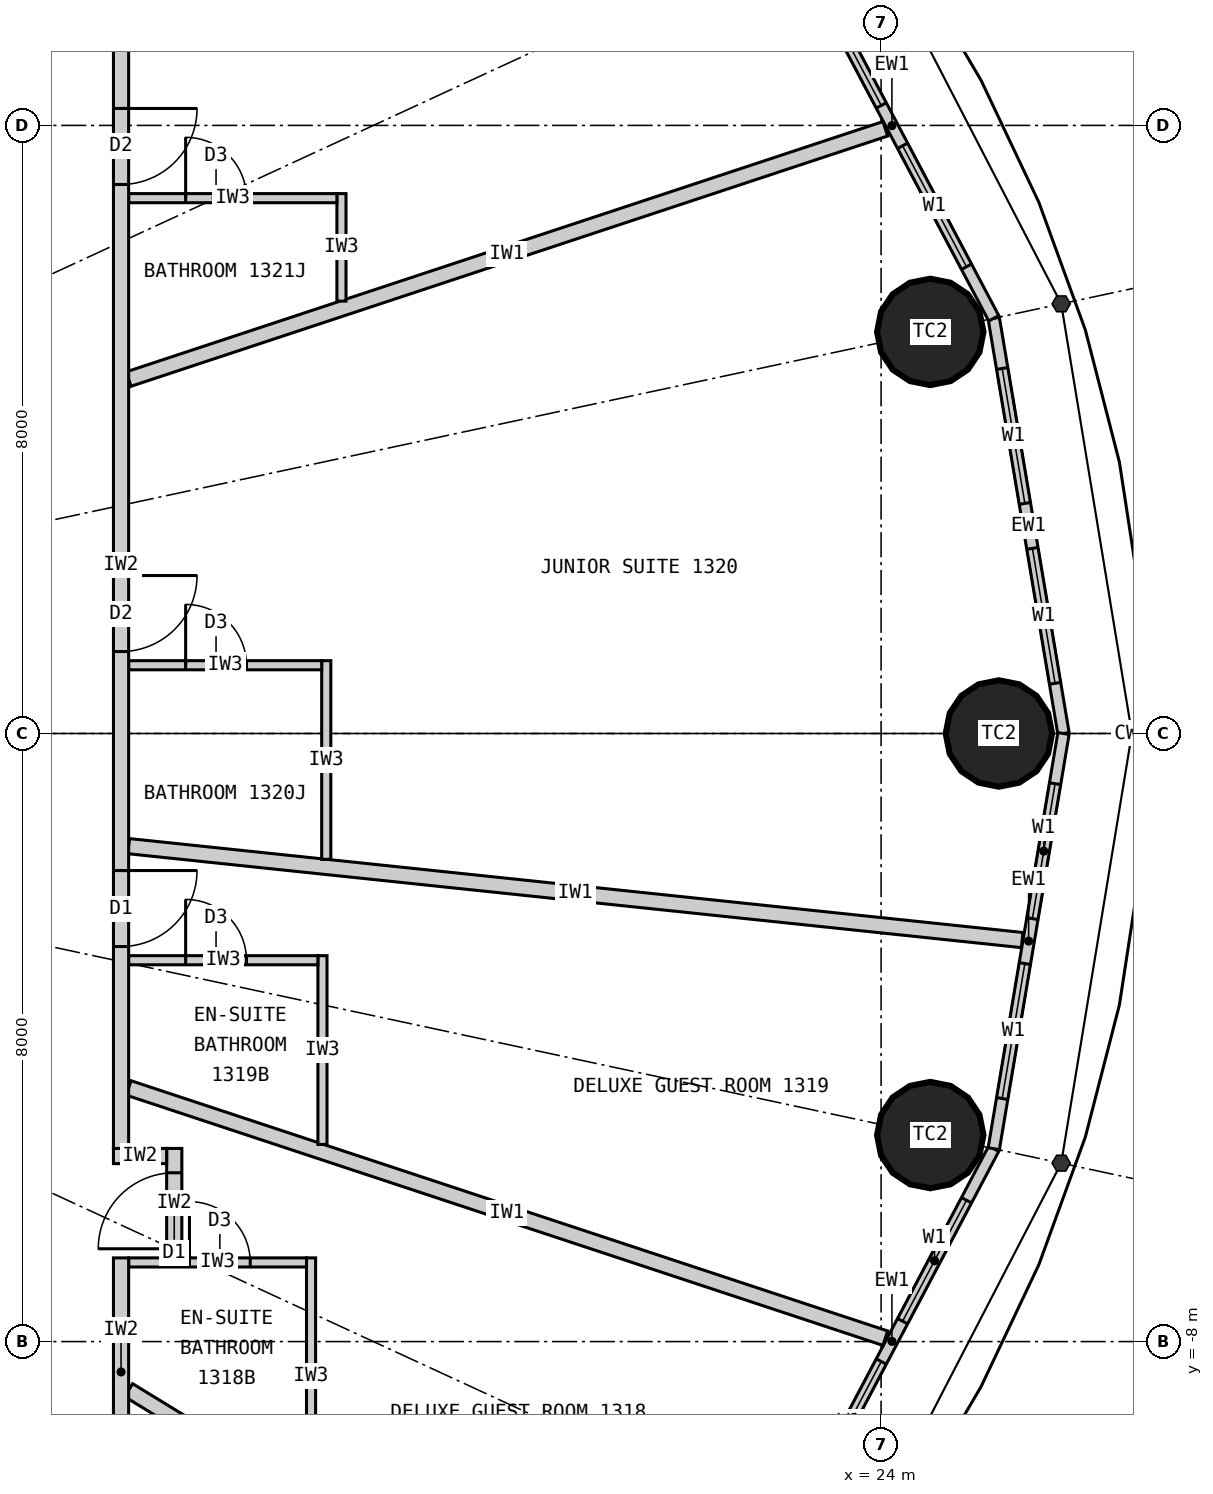
"""IFC4 building model, lengths in metres.
Left out: names, types, materials, properties, quantities, classifications, styles, units other than length and angle.
Written with IfcOpenShell. Run it as: python <this file> out.ifc"""

import sys

from ifc_helpers import new_model, si_unit, direction, frame, frame_2d, origin, origin_2d, place, context, subcontext, project, spatial, rectangle, circle, extrude, element, fill, save


model = new_model("IFC4")
c1 = context("Model", 3, precision=1e-05, world=origin(), true_north=direction((0.0, 1.0)))
c2 = subcontext(c1, "Body", "Model", "MODEL_VIEW")
j1 = project(units=[si_unit("LENGTHUNIT", "METRE"), si_unit("PLANEANGLEUNIT", "RADIAN")], contexts=[c1])
p1 = place(None, origin())
s1 = spatial("IfcSite", under=j1, at=p1, CompositionType="ELEMENT")
p2 = place(p1, origin())
s2 = spatial("IfcBuilding", under=s1, at=p2, CompositionType="ELEMENT")
p3 = place(p2, frame((0.0, 0.0, 57.3)))
s3 = spatial("IfcBuildingStorey", under=s2, at=p3, CompositionType="ELEMENT", Elevation=57.3)
for number, where, z_axis, x_axis in (
    (1, (25.55, 0.0, 0.0), (0.0, 0.0, 1.0), (1.0, 0.0, 0.0)),
    (2, (24.647, 5.283, 0.0), (0.0, 0.0, 1.0), (1.0, 0.0, 0.0)),
    (3, (24.647, -5.283, 0.0), (0.0, 0.0, 1.0), (1.0, 0.0, 0.0)),
):
    element("IfcColumn", number, at=place(p3, frame(where, z_axis=z_axis, x_axis=x_axis)), inside=s3, PredefinedType="COLUMN", context=c2, shape_type="SweptSolid", body=[
        extrude(circle(Radius=0.7, at=origin_2d()), origin(), (0.0, 0.0, 1.0), 3.3),
    ])
p4 = place(p3, frame((26.4, 0.0, 0.0), z_axis=(0.0, 0.0, 1.0), x_axis=(-0.165642551694, 0.986185857264, 0.0)))
e4 = element("IfcWall", 4, at=p4, inside=s3, PredefinedType="ELEMENTEDWALL", context=c2, shape_type="SweptSolid", body=[
    extrude(rectangle(XDim=5.539, YDim=0.15, at=frame_2d((2.77, 0.0))), origin(), (0.0, 0.0, 1.0), 3.12),
])
p5 = place(p4, frame((0.669, 0.0, 0.9)))
e5 = element("IfcOpeningElement", 5, at=p5, cuts=e4, PredefinedType="OPENING", context=c2, shape_type="SweptSolid", body=[
    extrude(rectangle(XDim=1.8, YDim=1.9, at=frame_2d((0.9, 0.95))), frame((0.0, 0.085, 0.0), z_axis=(0.0, -1.0, 0.0), x_axis=(1.0, 0.0, 0.0)), (0.0, 0.0, 1.0), 0.17),
])
p6 = place(p4, frame((3.07, 0.0, 0.9)))
e6 = element("IfcOpeningElement", 6, at=p6, cuts=e4, PredefinedType="OPENING", context=c2, shape_type="SweptSolid", body=[
    extrude(rectangle(XDim=1.8, YDim=1.9, at=frame_2d((0.9, 0.95))), frame((0.0, 0.085, 0.0), z_axis=(0.0, -1.0, 0.0), x_axis=(1.0, 0.0, 0.0)), (0.0, 0.0, 1.0), 0.17),
])
p7 = place(p3, frame((25.482, 5.462, 0.0), z_axis=(0.0, 0.0, 1.0), x_axis=(-0.467296867008, 0.884100468321, 0.0)))
e7 = element("IfcWall", 7, at=p7, inside=s3, PredefinedType="ELEMENTEDWALL", context=c2, shape_type="SweptSolid", body=[
    extrude(rectangle(XDim=5.734, YDim=0.15, at=frame_2d((2.867, 0.0))), origin(), (0.0, 0.0, 1.0), 3.12),
])
p8 = place(p7, frame((0.767, 0.0, 0.9)))
e8 = element("IfcOpeningElement", 8, at=p8, cuts=e7, PredefinedType="OPENING", context=c2, shape_type="SweptSolid", body=[
    extrude(rectangle(XDim=1.8, YDim=1.9, at=frame_2d((0.9, 0.95))), frame((0.0, 0.085, 0.0), z_axis=(0.0, -1.0, 0.0), x_axis=(1.0, 0.0, 0.0)), (0.0, 0.0, 1.0), 0.17),
])
p9 = place(p7, frame((3.167, 0.0, 0.9)))
e9 = element("IfcOpeningElement", 9, at=p9, cuts=e7, PredefinedType="OPENING", context=c2, shape_type="SweptSolid", body=[
    extrude(rectangle(XDim=1.8, YDim=1.9, at=frame_2d((0.9, 0.95))), frame((0.0, 0.085, 0.0), z_axis=(0.0, -1.0, 0.0), x_axis=(1.0, 0.0, 0.0)), (0.0, 0.0, 1.0), 0.17),
])
p10 = place(p3, frame((22.803, -10.532, 0.0), z_axis=(0.0, 0.0, 1.0), x_axis=(0.467296867008, 0.884100468321, 0.0)))
e10 = element("IfcWall", 10, at=p10, inside=s3, PredefinedType="ELEMENTEDWALL", context=c2, shape_type="SweptSolid", body=[
    extrude(rectangle(XDim=5.734, YDim=0.15, at=frame_2d((2.867, 0.0))), origin(), (0.0, 0.0, 1.0), 3.12),
])
p11 = place(p10, frame((0.767, 0.0, 0.9)))
e11 = element("IfcOpeningElement", 11, at=p11, cuts=e10, PredefinedType="OPENING", context=c2, shape_type="SweptSolid", body=[
    extrude(rectangle(XDim=1.8, YDim=1.9, at=frame_2d((0.9, 0.95))), frame((0.0, 0.085, 0.0), z_axis=(0.0, -1.0, 0.0), x_axis=(1.0, 0.0, 0.0)), (0.0, 0.0, 1.0), 0.17),
])
p12 = place(p10, frame((3.167, 0.0, 0.9)))
e12 = element("IfcOpeningElement", 12, at=p12, cuts=e10, PredefinedType="OPENING", context=c2, shape_type="SweptSolid", body=[
    extrude(rectangle(XDim=1.8, YDim=1.9, at=frame_2d((0.9, 0.95))), frame((0.0, 0.085, 0.0), z_axis=(0.0, -1.0, 0.0), x_axis=(1.0, 0.0, 0.0)), (0.0, 0.0, 1.0), 0.17),
])
p13 = place(p3, frame((25.482, -5.462, 0.0), z_axis=(0.0, 0.0, 1.0), x_axis=(0.165642551694, 0.986185857264, 0.0)))
e13 = element("IfcWall", 13, at=p13, inside=s3, PredefinedType="ELEMENTEDWALL", context=c2, shape_type="SweptSolid", body=[
    extrude(rectangle(XDim=5.539, YDim=0.15, at=frame_2d((2.77, 0.0))), origin(), (0.0, 0.0, 1.0), 3.12),
])
p14 = place(p13, frame((0.669, 0.0, 0.9)))
e14 = element("IfcOpeningElement", 14, at=p14, cuts=e13, PredefinedType="OPENING", context=c2, shape_type="SweptSolid", body=[
    extrude(rectangle(XDim=1.8, YDim=1.9, at=frame_2d((0.9, 0.95))), frame((0.0, 0.085, 0.0), z_axis=(0.0, -1.0, 0.0), x_axis=(1.0, 0.0, 0.0)), (0.0, 0.0, 1.0), 0.17),
])
p15 = place(p13, frame((3.07, 0.0, 0.9)))
e15 = element("IfcOpeningElement", 15, at=p15, cuts=e13, PredefinedType="OPENING", context=c2, shape_type="SweptSolid", body=[
    extrude(rectangle(XDim=1.8, YDim=1.9, at=frame_2d((0.9, 0.95))), frame((0.0, 0.085, 0.0), z_axis=(0.0, -1.0, 0.0), x_axis=(1.0, 0.0, 0.0)), (0.0, 0.0, 1.0), 0.17),
])
p16 = place(p3, frame((14.1, 4.663, 0.0), z_axis=(0.0, 0.0, 1.0), x_axis=(0.949432655039, 0.31397075269, 0.0)))
e16 = element("IfcWall", 16, at=p16, inside=s3, PredefinedType="PARTITIONING", context=c2, shape_type="SweptSolid", body=[
    extrude(rectangle(XDim=10.486, YDim=0.2, at=frame_2d((5.243, 0.0))), origin(), (0.0, 0.0, 1.0), 3.12),
])
p17 = place(p3, frame((14.1, -8.639, 0.0), z_axis=(0.0, 0.0, 1.0), x_axis=(0.852672493023, -0.522445805459, 0.0)))
e17 = element("IfcWall", 17, at=p17, inside=s3, PredefinedType="PARTITIONING", context=c2, shape_type="SweptSolid", body=[
    extrude(rectangle(XDim=7.633, YDim=0.2, at=frame_2d((3.817, 0.0))), origin(), (0.0, 0.0, 1.0), 3.12),
])
p18 = place(p3, frame((14.1, -4.663, 0.0), z_axis=(0.0, 0.0, 1.0), x_axis=(0.949432655039, -0.31397075269, 0.0)))
e18 = element("IfcWall", 18, at=p18, inside=s3, PredefinedType="PARTITIONING", context=c2, shape_type="SweptSolid", body=[
    extrude(rectangle(XDim=10.486, YDim=0.2, at=frame_2d((5.243, 0.0))), origin(), (0.0, 0.0, 1.0), 3.12),
])
p19 = place(p3, frame((14.1, -1.482, 0.0), z_axis=(0.0, 0.0, 1.0), x_axis=(0.994522076235, -0.104526742422, 0.0)))
e19 = element("IfcWall", 19, at=p19, inside=s3, PredefinedType="PARTITIONING", context=c2, shape_type="SweptSolid", body=[
    extrude(rectangle(XDim=11.821, YDim=0.2, at=frame_2d((5.91, 0.0))), origin(), (0.0, 0.0, 1.0), 2.32),
])
p20 = place(p3, frame((16.5, -10.01, 0.0), z_axis=(0.0, 0.0, 1.0), x_axis=(0.0, 1.0, 0.0)))
e20 = element("IfcWall", 20, at=p20, inside=s3, PredefinedType="PARTITIONING", context=c2, shape_type="SweptSolid", body=[
    extrude(rectangle(XDim=3.111, YDim=0.12, at=frame_2d((1.555, 0.0))), origin(), (0.0, 0.0, 1.0), 3.12),
])
p21 = place(p3, frame((14.1, -6.959, 0.0), z_axis=(0.0, 0.0, 1.0), x_axis=(1.0, 0.0, 0.0)))
e21 = element("IfcWall", 21, at=p21, inside=s3, PredefinedType="PARTITIONING", context=c2, shape_type="SweptSolid", body=[
    extrude(rectangle(XDim=2.34, YDim=0.12, at=frame_2d((1.17, 0.0))), origin(), (0.0, 0.0, 1.0), 3.12),
])
p22 = place(p21, frame((0.8, 0.0, 0.0)))
e22 = element("IfcOpeningElement", 22, at=p22, cuts=e21, PredefinedType="OPENING", context=c2, shape_type="SweptSolid", body=[
    extrude(rectangle(XDim=0.8, YDim=2.1, at=frame_2d((0.4, 1.05))), frame((0.0, 0.07, 0.0), z_axis=(0.0, -1.0, 0.0), x_axis=(1.0, 0.0, 0.0)), (0.0, 0.0, 1.0), 0.14),
])
p23 = place(p3, frame((16.65, -5.406, 0.0), z_axis=(0.0, 0.0, 1.0), x_axis=(0.0, 1.0, 0.0)))
e23 = element("IfcWall", 23, at=p23, inside=s3, PredefinedType="PARTITIONING", context=c2, shape_type="SweptSolid", body=[
    extrude(rectangle(XDim=2.483, YDim=0.12, at=frame_2d((1.242, 0.0))), origin(), (0.0, 0.0, 1.0), 3.12),
])
p24 = place(p3, frame((14.1, -2.983, 0.0), z_axis=(0.0, 0.0, 1.0), x_axis=(1.0, 0.0, 0.0)))
e24 = element("IfcWall", 24, at=p24, inside=s3, PredefinedType="PARTITIONING", context=c2, shape_type="SweptSolid", body=[
    extrude(rectangle(XDim=2.49, YDim=0.12, at=frame_2d((1.245, 0.0))), origin(), (0.0, 0.0, 1.0), 3.12),
])
p25 = place(p24, frame((0.75, 0.0, 0.0)))
e25 = element("IfcOpeningElement", 25, at=p25, cuts=e24, PredefinedType="OPENING", context=c2, shape_type="SweptSolid", body=[
    extrude(rectangle(XDim=0.8, YDim=2.1, at=frame_2d((0.4, 1.05))), frame((0.0, 0.07, 0.0), z_axis=(0.0, -1.0, 0.0), x_axis=(1.0, 0.0, 0.0)), (0.0, 0.0, 1.0), 0.14),
])
p26 = place(p3, frame((16.7, -1.655, 0.0), z_axis=(0.0, 0.0, 1.0), x_axis=(0.0, 1.0, 0.0)))
e26 = element("IfcWall", 26, at=p26, inside=s3, PredefinedType="PARTITIONING", context=c2, shape_type="SweptSolid", body=[
    extrude(rectangle(XDim=2.613, YDim=0.12, at=frame_2d((1.307, 0.0))), origin(), (0.0, 0.0, 1.0), 3.12),
])
p27 = place(p3, frame((14.1, 0.898, 0.0), z_axis=(0.0, 0.0, 1.0), x_axis=(1.0, 0.0, 0.0)))
e27 = element("IfcWall", 27, at=p27, inside=s3, PredefinedType="PARTITIONING", context=c2, shape_type="SweptSolid", body=[
    extrude(rectangle(XDim=2.54, YDim=0.12, at=frame_2d((1.27, 0.0))), origin(), (0.0, 0.0, 1.0), 3.12),
])
p28 = place(p27, frame((0.75, 0.0, 0.0)))
e28 = element("IfcOpeningElement", 28, at=p28, cuts=e27, PredefinedType="OPENING", context=c2, shape_type="SweptSolid", body=[
    extrude(rectangle(XDim=0.8, YDim=2.1, at=frame_2d((0.4, 1.05))), frame((0.0, 0.07, 0.0), z_axis=(0.0, -1.0, 0.0), x_axis=(1.0, 0.0, 0.0)), (0.0, 0.0, 1.0), 0.14),
])
p29 = place(p3, frame((16.9, 5.689, 0.0), z_axis=(0.0, 0.0, 1.0), x_axis=(0.0, 1.0, 0.0)))
e29 = element("IfcWall", 29, at=p29, inside=s3, PredefinedType="PARTITIONING", context=c2, shape_type="SweptSolid", body=[
    extrude(rectangle(XDim=1.414, YDim=0.12, at=frame_2d((0.707, 0.0))), origin(), (0.0, 0.0, 1.0), 3.12),
])
p30 = place(p3, frame((14.1, 7.043, 0.0), z_axis=(0.0, 0.0, 1.0), x_axis=(1.0, 0.0, 0.0)))
e30 = element("IfcWall", 30, at=p30, inside=s3, PredefinedType="PARTITIONING", context=c2, shape_type="SweptSolid", body=[
    extrude(rectangle(XDim=2.74, YDim=0.12, at=frame_2d((1.37, 0.0))), origin(), (0.0, 0.0, 1.0), 3.12),
])
p31 = place(p30, frame((0.75, 0.0, 0.0)))
e31 = element("IfcOpeningElement", 31, at=p31, cuts=e30, PredefinedType="OPENING", context=c2, shape_type="SweptSolid", body=[
    extrude(rectangle(XDim=0.8, YDim=2.1, at=frame_2d((0.4, 1.05))), frame((0.0, 0.07, 0.0), z_axis=(0.0, -1.0, 0.0), x_axis=(1.0, 0.0, 0.0)), (0.0, 0.0, 1.0), 0.14),
])
p32 = place(p3, frame((14.7, -6.899, 0.0), z_axis=(0.0, 0.0, 1.0), x_axis=(0.0, 1.0, 0.0)))
e32 = element("IfcWall", 32, at=p32, inside=s3, PredefinedType="PARTITIONING", context=c2, shape_type="SweptSolid", body=[
    extrude(rectangle(XDim=1.44, YDim=0.2, at=frame_2d((0.72, 0.0))), origin(), (0.0, 0.0, 1.0), 3.12),
])
p33 = place(p32, frame((0.12, 0.0, 0.0)))
e33 = element("IfcOpeningElement", 33, at=p33, cuts=e32, PredefinedType="OPENING", context=c2, shape_type="SweptSolid", body=[
    extrude(rectangle(XDim=1.0, YDim=2.2, at=frame_2d((0.5, 1.1))), frame((0.0, 0.11, 0.0), z_axis=(0.0, -1.0, 0.0), x_axis=(1.0, 0.0, 0.0)), (0.0, 0.0, 1.0), 0.22),
])
p34 = place(p3, frame((13.9, -5.559, 0.0), z_axis=(0.0, 0.0, 1.0), x_axis=(1.0, 0.0, 0.0)))
e34 = element("IfcWall", 34, at=p34, inside=s3, PredefinedType="PARTITIONING", context=c2, shape_type="SweptSolid", body=[
    extrude(rectangle(XDim=0.7, YDim=0.2, at=frame_2d((0.35, 0.0))), origin(), (0.0, 0.0, 1.0), 3.12),
])
p35 = place(p3, frame((14.0, -9.9, 0.0), z_axis=(0.0, 0.0, 1.0), x_axis=(0.0, 1.0, 0.0)))
e35 = element("IfcWall", 35, at=p35, inside=s3, PredefinedType="PARTITIONING", context=c2, shape_type="SweptSolid", body=[
    extrude(rectangle(XDim=3.001, YDim=0.2, at=frame_2d((1.5, 0.0))), origin(), (0.0, 0.0, 1.0), 3.12),
])
p36 = place(p3, frame((14.0, -5.459, 0.0), z_axis=(0.0, 0.0, 1.0), x_axis=(0.0, 1.0, 0.0)))
e36 = element("IfcWall", 36, at=p36, inside=s3, PredefinedType="PARTITIONING", context=c2, shape_type="SweptSolid", body=[
    extrude(rectangle(XDim=15.359, YDim=0.2, at=frame_2d((7.679, 0.0))), origin(), (0.0, 0.0, 1.0), 3.12),
])
p37 = place(p36, frame((2.656, 0.0, 0.0)))
e37 = element("IfcOpeningElement", 37, at=p37, cuts=e36, PredefinedType="OPENING", context=c2, shape_type="SweptSolid", body=[
    extrude(rectangle(XDim=1.0, YDim=2.2, at=frame_2d((0.5, 1.1))), frame((0.0, 0.11, 0.0), z_axis=(0.0, -1.0, 0.0), x_axis=(1.0, 0.0, 0.0)), (0.0, 0.0, 1.0), 0.22),
])
p38 = place(p36, frame((6.537, 0.0, 0.0)))
e38 = element("IfcOpeningElement", 38, at=p38, cuts=e36, PredefinedType="OPENING", context=c2, shape_type="SweptSolid", body=[
    extrude(rectangle(XDim=1.0, YDim=2.2, at=frame_2d((0.5, 1.1))), frame((0.0, 0.11, 0.0), z_axis=(0.0, -1.0, 0.0), x_axis=(1.0, 0.0, 0.0)), (0.0, 0.0, 1.0), 0.22),
])
p39 = place(p36, frame((12.682, 0.0, 0.0)))
e39 = element("IfcOpeningElement", 39, at=p39, cuts=e36, PredefinedType="OPENING", context=c2, shape_type="SweptSolid", body=[
    extrude(rectangle(XDim=1.0, YDim=2.2, at=frame_2d((0.5, 1.1))), frame((0.0, 0.11, 0.0), z_axis=(0.0, -1.0, 0.0), x_axis=(1.0, 0.0, 0.0)), (0.0, 0.0, 1.0), 0.22),
])
p40 = place(p5, origin())
e40 = element("IfcWindow", 40, at=p40, inside=s3, PartitioningType="SINGLE_PANEL", PredefinedType="WINDOW", context=c2, shape_type="SweptSolid", body=[
    extrude(rectangle(XDim=1.8, YDim=1.9, at=frame_2d((0.9, 0.95))), frame((0.0, 0.03, 0.0), z_axis=(0.0, -1.0, 0.0), x_axis=(1.0, 0.0, 0.0)), (0.0, 0.0, 1.0), 0.06),
])
fill(e5, e40)
p41 = place(p6, origin())
e41 = element("IfcWindow", 41, at=p41, inside=s3, PartitioningType="SINGLE_PANEL", PredefinedType="WINDOW", context=c2, shape_type="SweptSolid", body=[
    extrude(rectangle(XDim=1.8, YDim=1.9, at=frame_2d((0.9, 0.95))), frame((0.0, 0.03, 0.0), z_axis=(0.0, -1.0, 0.0), x_axis=(1.0, 0.0, 0.0)), (0.0, 0.0, 1.0), 0.06),
])
fill(e6, e41)
p42 = place(p8, origin())
e42 = element("IfcWindow", 42, at=p42, inside=s3, PartitioningType="SINGLE_PANEL", PredefinedType="WINDOW", context=c2, shape_type="SweptSolid", body=[
    extrude(rectangle(XDim=1.8, YDim=1.9, at=frame_2d((0.9, 0.95))), frame((0.0, 0.03, 0.0), z_axis=(0.0, -1.0, 0.0), x_axis=(1.0, 0.0, 0.0)), (0.0, 0.0, 1.0), 0.06),
])
fill(e8, e42)
p43 = place(p9, origin())
e43 = element("IfcWindow", 43, at=p43, inside=s3, PartitioningType="SINGLE_PANEL", PredefinedType="WINDOW", context=c2, shape_type="SweptSolid", body=[
    extrude(rectangle(XDim=1.8, YDim=1.9, at=frame_2d((0.9, 0.95))), frame((0.0, 0.03, 0.0), z_axis=(0.0, -1.0, 0.0), x_axis=(1.0, 0.0, 0.0)), (0.0, 0.0, 1.0), 0.06),
])
fill(e9, e43)
p44 = place(p11, origin())
e44 = element("IfcWindow", 44, at=p44, inside=s3, PartitioningType="SINGLE_PANEL", PredefinedType="WINDOW", context=c2, shape_type="SweptSolid", body=[
    extrude(rectangle(XDim=1.8, YDim=1.9, at=frame_2d((0.9, 0.95))), frame((0.0, 0.03, 0.0), z_axis=(0.0, -1.0, 0.0), x_axis=(1.0, 0.0, 0.0)), (0.0, 0.0, 1.0), 0.06),
])
fill(e11, e44)
p45 = place(p12, origin())
e45 = element("IfcWindow", 45, at=p45, inside=s3, PartitioningType="SINGLE_PANEL", PredefinedType="WINDOW", context=c2, shape_type="SweptSolid", body=[
    extrude(rectangle(XDim=1.8, YDim=1.9, at=frame_2d((0.9, 0.95))), frame((0.0, 0.03, 0.0), z_axis=(0.0, -1.0, 0.0), x_axis=(1.0, 0.0, 0.0)), (0.0, 0.0, 1.0), 0.06),
])
fill(e12, e45)
p46 = place(p14, origin())
e46 = element("IfcWindow", 46, at=p46, inside=s3, PartitioningType="SINGLE_PANEL", PredefinedType="WINDOW", context=c2, shape_type="SweptSolid", body=[
    extrude(rectangle(XDim=1.8, YDim=1.9, at=frame_2d((0.9, 0.95))), frame((0.0, 0.03, 0.0), z_axis=(0.0, -1.0, 0.0), x_axis=(1.0, 0.0, 0.0)), (0.0, 0.0, 1.0), 0.06),
])
fill(e14, e46)
p47 = place(p15, origin())
e47 = element("IfcWindow", 47, at=p47, inside=s3, PartitioningType="SINGLE_PANEL", PredefinedType="WINDOW", context=c2, shape_type="SweptSolid", body=[
    extrude(rectangle(XDim=1.8, YDim=1.9, at=frame_2d((0.9, 0.95))), frame((0.0, 0.03, 0.0), z_axis=(0.0, -1.0, 0.0), x_axis=(1.0, 0.0, 0.0)), (0.0, 0.0, 1.0), 0.06),
])
fill(e15, e47)
p48 = place(p22, origin())
e48 = element("IfcDoor", 48, at=p48, inside=s3, OperationType="SINGLE_SWING_LEFT", PredefinedType="DOOR", context=c2, shape_type="SweptSolid", body=[
    extrude(rectangle(XDim=0.8, YDim=2.1, at=frame_2d((0.4, 1.05))), frame((0.0, 0.025, 0.0), z_axis=(0.0, -1.0, 0.0), x_axis=(1.0, 0.0, 0.0)), (0.0, 0.0, 1.0), 0.05),
])
fill(e22, e48)
p49 = place(p33, origin())
e49 = element("IfcDoor", 49, at=p49, inside=s3, OperationType="SINGLE_SWING_LEFT", PredefinedType="DOOR", context=c2, shape_type="SweptSolid", body=[
    extrude(rectangle(XDim=1.0, YDim=2.2, at=frame_2d((0.5, 1.1))), frame((0.0, 0.025, 0.0), z_axis=(0.0, -1.0, 0.0), x_axis=(1.0, 0.0, 0.0)), (0.0, 0.0, 1.0), 0.05),
])
fill(e33, e49)
p50 = place(p25, origin())
e50 = element("IfcDoor", 50, at=p50, inside=s3, OperationType="SINGLE_SWING_LEFT", PredefinedType="DOOR", context=c2, shape_type="SweptSolid", body=[
    extrude(rectangle(XDim=0.8, YDim=2.1, at=frame_2d((0.4, 1.05))), frame((0.0, 0.025, 0.0), z_axis=(0.0, -1.0, 0.0), x_axis=(1.0, 0.0, 0.0)), (0.0, 0.0, 1.0), 0.05),
])
fill(e25, e50)
p51 = place(p37, origin())
e51 = element("IfcDoor", 51, at=p51, inside=s3, OperationType="SINGLE_SWING_RIGHT", PredefinedType="DOOR", context=c2, shape_type="SweptSolid", body=[
    extrude(rectangle(XDim=1.0, YDim=2.2, at=frame_2d((0.5, 1.1))), frame((0.0, 0.025, 0.0), z_axis=(0.0, -1.0, 0.0), x_axis=(1.0, 0.0, 0.0)), (0.0, 0.0, 1.0), 0.05),
])
fill(e37, e51)
p52 = place(p28, origin())
e52 = element("IfcDoor", 52, at=p52, inside=s3, OperationType="SINGLE_SWING_LEFT", PredefinedType="DOOR", context=c2, shape_type="SweptSolid", body=[
    extrude(rectangle(XDim=0.8, YDim=2.1, at=frame_2d((0.4, 1.05))), frame((0.0, 0.025, 0.0), z_axis=(0.0, -1.0, 0.0), x_axis=(1.0, 0.0, 0.0)), (0.0, 0.0, 1.0), 0.05),
])
fill(e28, e52)
p53 = place(p38, origin())
e53 = element("IfcDoor", 53, at=p53, inside=s3, OperationType="SINGLE_SWING_RIGHT", PredefinedType="DOOR", context=c2, shape_type="SweptSolid", body=[
    extrude(rectangle(XDim=1.0, YDim=2.2, at=frame_2d((0.5, 1.1))), frame((0.0, 0.025, 0.0), z_axis=(0.0, -1.0, 0.0), x_axis=(1.0, 0.0, 0.0)), (0.0, 0.0, 1.0), 0.05),
])
fill(e38, e53)
p54 = place(p31, origin())
e54 = element("IfcDoor", 54, at=p54, inside=s3, OperationType="SINGLE_SWING_LEFT", PredefinedType="DOOR", context=c2, shape_type="SweptSolid", body=[
    extrude(rectangle(XDim=0.8, YDim=2.1, at=frame_2d((0.4, 1.05))), frame((0.0, 0.025, 0.0), z_axis=(0.0, -1.0, 0.0), x_axis=(1.0, 0.0, 0.0)), (0.0, 0.0, 1.0), 0.05),
])
fill(e31, e54)
p55 = place(p39, origin())
e55 = element("IfcDoor", 55, at=p55, inside=s3, OperationType="SINGLE_SWING_RIGHT", PredefinedType="DOOR", context=c2, shape_type="SweptSolid", body=[
    extrude(rectangle(XDim=1.0, YDim=2.2, at=frame_2d((0.5, 1.1))), frame((0.0, 0.025, 0.0), z_axis=(0.0, -1.0, 0.0), x_axis=(1.0, 0.0, 0.0)), (0.0, 0.0, 1.0), 0.05),
])
fill(e39, e55)
save(model, sys.argv[1])
